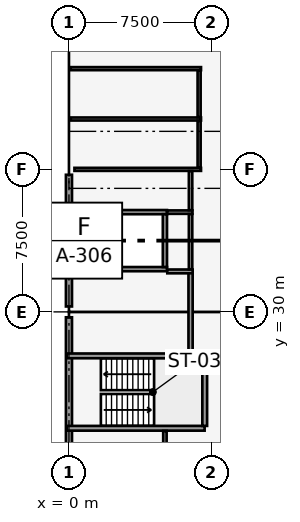
"""IFC4 building model, lengths in metres.
Left out: names, types, materials, properties, quantities, classifications, styles, units other than length and angle.
Written with IfcOpenShell. Run it as: python <this file> out.ifc"""

import sys

from ifc_helpers import new_model, si_unit, direction, frame, frame_2d, origin, origin_2d, place, context, subcontext, project, spatial, rectangle, extrude, element, fill, save


model = new_model("IFC4")
c1 = context("Model", 3, precision=1e-05, world=origin(), true_north=direction((0.0, 1.0)))
c2 = subcontext(c1, "Body", "Model", "MODEL_VIEW")
j1 = project(units=[si_unit("LENGTHUNIT", "METRE"), si_unit("PLANEANGLEUNIT", "RADIAN")], contexts=[c1])
p1 = place(None, origin())
s1 = spatial("IfcSite", under=j1, at=p1, CompositionType="ELEMENT")
p2 = place(p1, origin())
s2 = spatial("IfcBuilding", under=s1, at=p2, CompositionType="ELEMENT")
p3 = place(p2, frame((0.0, 0.0, 13.2)))
s3 = spatial("IfcBuildingStorey", under=s2, at=p3, CompositionType="ELEMENT", Elevation=13.2)
for number, where, z_axis, x_axis in (
    (1, (0.0, 30.0, 0.0), (0.0, 0.0, 1.0), (1.0, 0.0, 0.0)),
    (2, (0.0, 37.5, 0.0), (0.0, 0.0, 1.0), (1.0, 0.0, 0.0)),
):
    element("IfcColumn", number, at=place(p3, frame(where, z_axis=z_axis, x_axis=x_axis)), inside=s3, PredefinedType="COLUMN", context=c2, shape_type="SweptSolid", body=[
        extrude(rectangle(XDim=0.55, YDim=0.55, at=origin_2d()), origin(), (0.0, 0.0, 1.0), 3.9),
    ])
for number, where, z_axis, x_axis in (
    (3, (0.0, 22.785, 0.0), (0.0, 0.0, 1.0), (0.0, 1.0, 0.0)),
    (4, (0.0, 30.285, 0.0), (0.0, 0.0, 1.0), (0.0, 1.0, 0.0)),
):
    element("IfcWall", number, at=place(p3, frame(where, z_axis=z_axis, x_axis=x_axis)), inside=s3, PredefinedType="SOLIDWALL", context=c2, shape_type="SweptSolid", body=[
        extrude(rectangle(XDim=6.93, YDim=0.32, at=frame_2d((3.465, 0.0))), origin(), (0.0, 0.0, 1.0), 2.59),
    ])
p4 = place(p3, frame((-0.12, 23.875, 0.0), z_axis=(0.0, 0.0, 1.0), x_axis=(1.0, 0.0, 0.0)))
e5 = element("IfcWall", 5, at=p4, inside=s3, PredefinedType="SOLIDWALL", context=c2, shape_type="SweptSolid", body=[
    extrude(rectangle(XDim=7.26, YDim=0.25, at=frame_2d((3.63, 0.0))), origin(), (0.0, 0.0, 1.0), 3.62),
])
p5 = place(p3, frame((-0.12, 27.685, 0.0), z_axis=(0.0, 0.0, 1.0), x_axis=(1.0, 0.0, 0.0)))
e6 = element("IfcWall", 6, at=p5, inside=s3, PredefinedType="SOLIDWALL", context=c2, shape_type="SweptSolid", body=[
    extrude(rectangle(XDim=7.26, YDim=0.25, at=frame_2d((3.63, 0.0))), origin(), (0.0, 0.0, 1.0), 3.62),
])
p6 = place(p5, frame((0.45, 0.0, 0.0)))
e7 = element("IfcOpeningElement", 7, at=p6, cuts=e6, PredefinedType="OPENING", context=c2, shape_type="SweptSolid", body=[
    extrude(rectangle(XDim=1.1, YDim=2.15, at=frame_2d((0.55, 1.075))), frame((0.0, 0.135, 0.0), z_axis=(0.0, -1.0, 0.0), x_axis=(1.0, 0.0, 0.0)), (0.0, 0.0, 1.0), 0.27),
])
p7 = place(p3, frame((7.145, 24.0, 0.0), z_axis=(0.0, 0.0, 1.0), x_axis=(0.0, 1.0, 0.0)))
e8 = element("IfcWall", 8, at=p7, inside=s3, PredefinedType="SOLIDWALL", context=c2, shape_type="SweptSolid", body=[
    extrude(rectangle(XDim=3.56, YDim=0.25, at=frame_2d((1.78, 0.0))), origin(), (0.0, 0.0, 1.0), 3.62),
])
p8 = place(p3, frame((2.34, 32.25, 0.0), z_axis=(0.0, 0.0, 1.0), x_axis=(1.0, 0.0, 0.0)))
e9 = element("IfcWall", 9, at=p8, inside=s3, PredefinedType="SOLIDWALL", context=c2, shape_type="SweptSolid", body=[
    extrude(rectangle(XDim=2.82, YDim=0.22, at=frame_2d((1.41, 0.0))), origin(), (0.0, 0.0, 1.0), 3.62),
])
p9 = place(p8, frame((0.86, 0.0, 0.0)))
e10 = element("IfcOpeningElement", 10, at=p9, cuts=e9, PredefinedType="OPENING", context=c2, shape_type="SweptSolid", body=[
    extrude(rectangle(XDim=1.1, YDim=2.15, at=frame_2d((0.55, 1.075))), frame((0.0, 0.12, 0.0), z_axis=(0.0, -1.0, 0.0), x_axis=(1.0, 0.0, 0.0)), (0.0, 0.0, 1.0), 0.24),
])
p10 = place(p3, frame((2.34, 35.25, 0.0), z_axis=(0.0, 0.0, 1.0), x_axis=(1.0, 0.0, 0.0)))
e11 = element("IfcWall", 11, at=p10, inside=s3, PredefinedType="SOLIDWALL", context=c2, shape_type="SweptSolid", body=[
    extrude(rectangle(XDim=2.82, YDim=0.22, at=frame_2d((1.41, 0.0))), origin(), (0.0, 0.0, 1.0), 3.62),
])
for number, where, z_axis, x_axis in (
    (12, (2.45, 32.36, 0.0), (0.0, 0.0, 1.0), (0.0, 1.0, 0.0)),
    (13, (5.05, 32.36, 0.0), (0.0, 0.0, 1.0), (0.0, 1.0, 0.0)),
):
    element("IfcWall", number, at=place(p3, frame(where, z_axis=z_axis, x_axis=x_axis)), inside=s3, PredefinedType="SOLIDWALL", context=c2, shape_type="SweptSolid", body=[
        extrude(rectangle(XDim=2.78, YDim=0.22, at=frame_2d((1.39, 0.0))), origin(), (0.0, 0.0, 1.0), 3.62),
    ])
p11 = place(p3, frame((6.4, 27.82, 0.0), z_axis=(0.0, 0.0, 1.0), x_axis=(0.0, 1.0, 0.0)))
e14 = element("IfcWall", 14, at=p11, inside=s3, PredefinedType="SOLIDWALL", context=c2, shape_type="SweptSolid", body=[
    extrude(rectangle(XDim=4.31, YDim=0.22, at=frame_2d((2.155, 0.0))), origin(), (0.0, 0.0, 1.0), 3.62),
])
p12 = place(p11, frame((0.45, 0.0, 0.0)))
e15 = element("IfcOpeningElement", 15, at=p12, cuts=e14, PredefinedType="OPENING", context=c2, shape_type="SweptSolid", body=[
    extrude(rectangle(XDim=1.1, YDim=2.15, at=frame_2d((0.55, 1.075))), frame((0.0, 0.12, 0.0), z_axis=(0.0, -1.0, 0.0), x_axis=(1.0, 0.0, 0.0)), (0.0, 0.0, 1.0), 0.24),
])
p13 = place(p3, frame((0.18, 32.13, 0.0), z_axis=(0.0, 0.0, 1.0), x_axis=(1.0, 0.0, 0.0)))
e16 = element("IfcWall", 16, at=p13, inside=s3, PredefinedType="PARTITIONING", context=c2, shape_type="SweptSolid", body=[
    extrude(rectangle(XDim=2.145, YDim=0.2, at=frame_2d((1.073, 0.0))), origin(), (0.0, 0.0, 1.0), 2.85),
])
p14 = place(p3, frame((5.175, 32.13, 0.0), z_axis=(0.0, 0.0, 1.0), x_axis=(1.0, 0.0, 0.0)))
e17 = element("IfcWall", 17, at=p14, inside=s3, PredefinedType="PARTITIONING", context=c2, shape_type="SweptSolid", body=[
    extrude(rectangle(XDim=1.335, YDim=0.2, at=frame_2d((0.667, 0.0))), origin(), (0.0, 0.0, 1.0), 3.05),
])
p15 = place(p3, frame((5.05, 20.274, 0.0), z_axis=(0.0, 0.0, 1.0), x_axis=(0.0, 1.0, 0.0)))
e18 = element("IfcWall", 18, at=p15, inside=s3, PredefinedType="PARTITIONING", context=c2, shape_type="SweptSolid", body=[
    extrude(rectangle(XDim=3.462, YDim=0.18, at=frame_2d((1.731, 0.0))), origin(), (0.0, 0.0, 1.0), 2.59),
])
p16 = place(p3, frame((0.174, 35.25, 0.0), z_axis=(0.0, 0.0, 1.0), x_axis=(1.0, 0.0, 0.0)))
e19 = element("IfcWall", 19, at=p16, inside=s3, PredefinedType="PARTITIONING", context=c2, shape_type="SweptSolid", body=[
    extrude(rectangle(XDim=2.166, YDim=0.18, at=frame_2d((1.083, 0.0))), origin(), (0.0, 0.0, 1.0), 2.84),
])
p17 = place(p3, frame((5.16, 35.25, 0.0), z_axis=(0.0, 0.0, 1.0), x_axis=(1.0, 0.0, 0.0)))
e20 = element("IfcWall", 20, at=p17, inside=s3, PredefinedType="PARTITIONING", context=c2, shape_type="SweptSolid", body=[
    extrude(rectangle(XDim=1.34, YDim=0.18, at=frame_2d((0.67, 0.0))), origin(), (0.0, 0.0, 1.0), 2.97),
])
p18 = place(p3, frame((0.289, 37.5, 0.0), z_axis=(0.0, 0.0, 1.0), x_axis=(1.0, 0.0, 0.0)))
e21 = element("IfcWall", 21, at=p18, inside=s3, PredefinedType="PARTITIONING", context=c2, shape_type="SweptSolid", body=[
    extrude(rectangle(XDim=6.661, YDim=0.16, at=frame_2d((3.331, 0.0))), origin(), (0.0, 0.0, 1.0), 2.59),
])
p19 = place(p3, frame((6.4, 32.244, 0.0), z_axis=(0.0, 0.0, 1.0), x_axis=(0.0, 1.0, 0.0)))
e22 = element("IfcWall", 22, at=p19, inside=s3, PredefinedType="PARTITIONING", context=c2, shape_type="SweptSolid", body=[
    extrude(rectangle(XDim=2.902, YDim=0.18, at=frame_2d((1.451, 0.0))), origin(), (0.0, 0.0, 1.0), 2.97),
])
p20 = place(p3, frame((6.4, 35.354, 0.0), z_axis=(0.0, 0.0, 1.0), x_axis=(0.0, 1.0, 0.0)))
e23 = element("IfcWall", 23, at=p20, inside=s3, PredefinedType="PARTITIONING", context=c2, shape_type="SweptSolid", body=[
    extrude(rectangle(XDim=2.052, YDim=0.18, at=frame_2d((1.026, 0.0))), origin(), (0.0, 0.0, 1.0), 2.59),
])
p21 = place(p20, frame((0.546, 0.0, 0.0)))
e24 = element("IfcOpeningElement", 24, at=p21, cuts=e23, PredefinedType="OPENING", context=c2, shape_type="SweptSolid", body=[
    extrude(rectangle(XDim=0.9, YDim=2.1, at=frame_2d((0.45, 1.05))), frame((0.0, 0.1, 0.0), z_axis=(0.0, -1.0, 0.0), x_axis=(1.0, 0.0, 0.0)), (0.0, 0.0, 1.0), 0.2),
])
for number, where, z_axis, x_axis in (
    (25, (0.092, 40.15, 0.0), (0.0, 0.0, 1.0), (1.0, 0.0, 0.0)),
    (26, (0.092, 42.8, 0.0), (0.0, 0.0, 1.0), (1.0, 0.0, 0.0)),
):
    element("IfcWall", number, at=place(p3, frame(where, z_axis=z_axis, x_axis=x_axis)), inside=s3, PredefinedType="PARTITIONING", context=c2, shape_type="SweptSolid", body=[
        extrude(rectangle(XDim=6.858, YDim=0.16, at=frame_2d((3.429, 0.0))), origin(), (0.0, 0.0, 1.0), 2.97),
    ])
p22 = place(p3, frame((6.85, 37.594, 0.0), z_axis=(0.0, 0.0, 1.0), x_axis=(0.0, 1.0, 0.0)))
e27 = element("IfcWall", 27, at=p22, inside=s3, PredefinedType="PARTITIONING", context=c2, shape_type="SweptSolid", body=[
    extrude(rectangle(XDim=2.462, YDim=0.16, at=frame_2d((1.231, 0.0))), origin(), (0.0, 0.0, 1.0), 2.59),
])
p23 = place(p22, frame((0.776, 0.0, 0.0)))
e28 = element("IfcOpeningElement", 28, at=p23, cuts=e27, PredefinedType="OPENING", context=c2, shape_type="SweptSolid", body=[
    extrude(rectangle(XDim=0.9, YDim=2.1, at=frame_2d((0.45, 1.05))), frame((0.0, 0.09, 0.0), z_axis=(0.0, -1.0, 0.0), x_axis=(1.0, 0.0, 0.0)), (0.0, 0.0, 1.0), 0.18),
])
p24 = place(p3, frame((6.85, 40.244, 0.0), z_axis=(0.0, 0.0, 1.0), x_axis=(0.0, 1.0, 0.0)))
e29 = element("IfcWall", 29, at=p24, inside=s3, PredefinedType="PARTITIONING", context=c2, shape_type="SweptSolid", body=[
    extrude(rectangle(XDim=2.462, YDim=0.16, at=frame_2d((1.231, 0.0))), origin(), (0.0, 0.0, 1.0), 2.97),
])
p25 = place(p24, frame((0.786, 0.0, 0.0)))
e30 = element("IfcOpeningElement", 30, at=p25, cuts=e29, PredefinedType="OPENING", context=c2, shape_type="SweptSolid", body=[
    extrude(rectangle(XDim=0.9, YDim=2.1, at=frame_2d((0.45, 1.05))), frame((0.0, 0.09, 0.0), z_axis=(0.0, -1.0, 0.0), x_axis=(1.0, 0.0, 0.0)), (0.0, 0.0, 1.0), 0.18),
])
p26 = place(p6, origin())
e31 = element("IfcDoor", 31, at=p26, inside=s3, OperationType="SINGLE_SWING_LEFT", PredefinedType="DOOR", context=c2, shape_type="SweptSolid", body=[
    extrude(rectangle(XDim=1.1, YDim=2.15, at=frame_2d((0.55, 1.075))), frame((0.0, 0.025, 0.0), z_axis=(0.0, -1.0, 0.0), x_axis=(1.0, 0.0, 0.0)), (0.0, 0.0, 1.0), 0.05),
])
fill(e7, e31)
p27 = place(p9, origin())
e32 = element("IfcDoor", 32, at=p27, inside=s3, OperationType="SLIDING_TO_LEFT", PredefinedType="DOOR", context=c2, shape_type="SweptSolid", body=[
    extrude(rectangle(XDim=1.1, YDim=2.15, at=frame_2d((0.55, 1.075))), frame((0.0, 0.025, 0.0), z_axis=(0.0, -1.0, 0.0), x_axis=(1.0, 0.0, 0.0)), (0.0, 0.0, 1.0), 0.05),
])
fill(e10, e32)
p28 = place(p12, origin())
e33 = element("IfcDoor", 33, at=p28, inside=s3, OperationType="SINGLE_SWING_LEFT", PredefinedType="DOOR", context=c2, shape_type="SweptSolid", body=[
    extrude(rectangle(XDim=1.1, YDim=2.15, at=frame_2d((0.55, 1.075))), frame((0.0, 0.025, 0.0), z_axis=(0.0, -1.0, 0.0), x_axis=(1.0, 0.0, 0.0)), (0.0, 0.0, 1.0), 0.05),
])
fill(e15, e33)
p29 = place(p21, origin())
e34 = element("IfcDoor", 34, at=p29, inside=s3, OperationType="SINGLE_SWING_RIGHT", PredefinedType="DOOR", context=c2, shape_type="SweptSolid", body=[
    extrude(rectangle(XDim=0.9, YDim=2.1, at=frame_2d((0.45, 1.05))), frame((0.0, 0.025, 0.0), z_axis=(0.0, -1.0, 0.0), x_axis=(1.0, 0.0, 0.0)), (0.0, 0.0, 1.0), 0.05),
])
fill(e24, e34)
p30 = place(p23, origin())
e35 = element("IfcDoor", 35, at=p30, inside=s3, OperationType="SINGLE_SWING_LEFT", PredefinedType="DOOR", context=c2, shape_type="SweptSolid", body=[
    extrude(rectangle(XDim=0.9, YDim=2.1, at=frame_2d((0.45, 1.05))), frame((0.0, 0.025, 0.0), z_axis=(0.0, -1.0, 0.0), x_axis=(1.0, 0.0, 0.0)), (0.0, 0.0, 1.0), 0.05),
])
fill(e28, e35)
p31 = place(p25, origin())
e36 = element("IfcDoor", 36, at=p31, inside=s3, OperationType="SINGLE_SWING_RIGHT", PredefinedType="DOOR", context=c2, shape_type="SweptSolid", body=[
    extrude(rectangle(XDim=0.9, YDim=2.1, at=frame_2d((0.45, 1.05))), frame((0.0, 0.025, 0.0), z_axis=(0.0, -1.0, 0.0), x_axis=(1.0, 0.0, 0.0)), (0.0, 0.0, 1.0), 0.05),
])
fill(e30, e36)
save(model, sys.argv[1])
